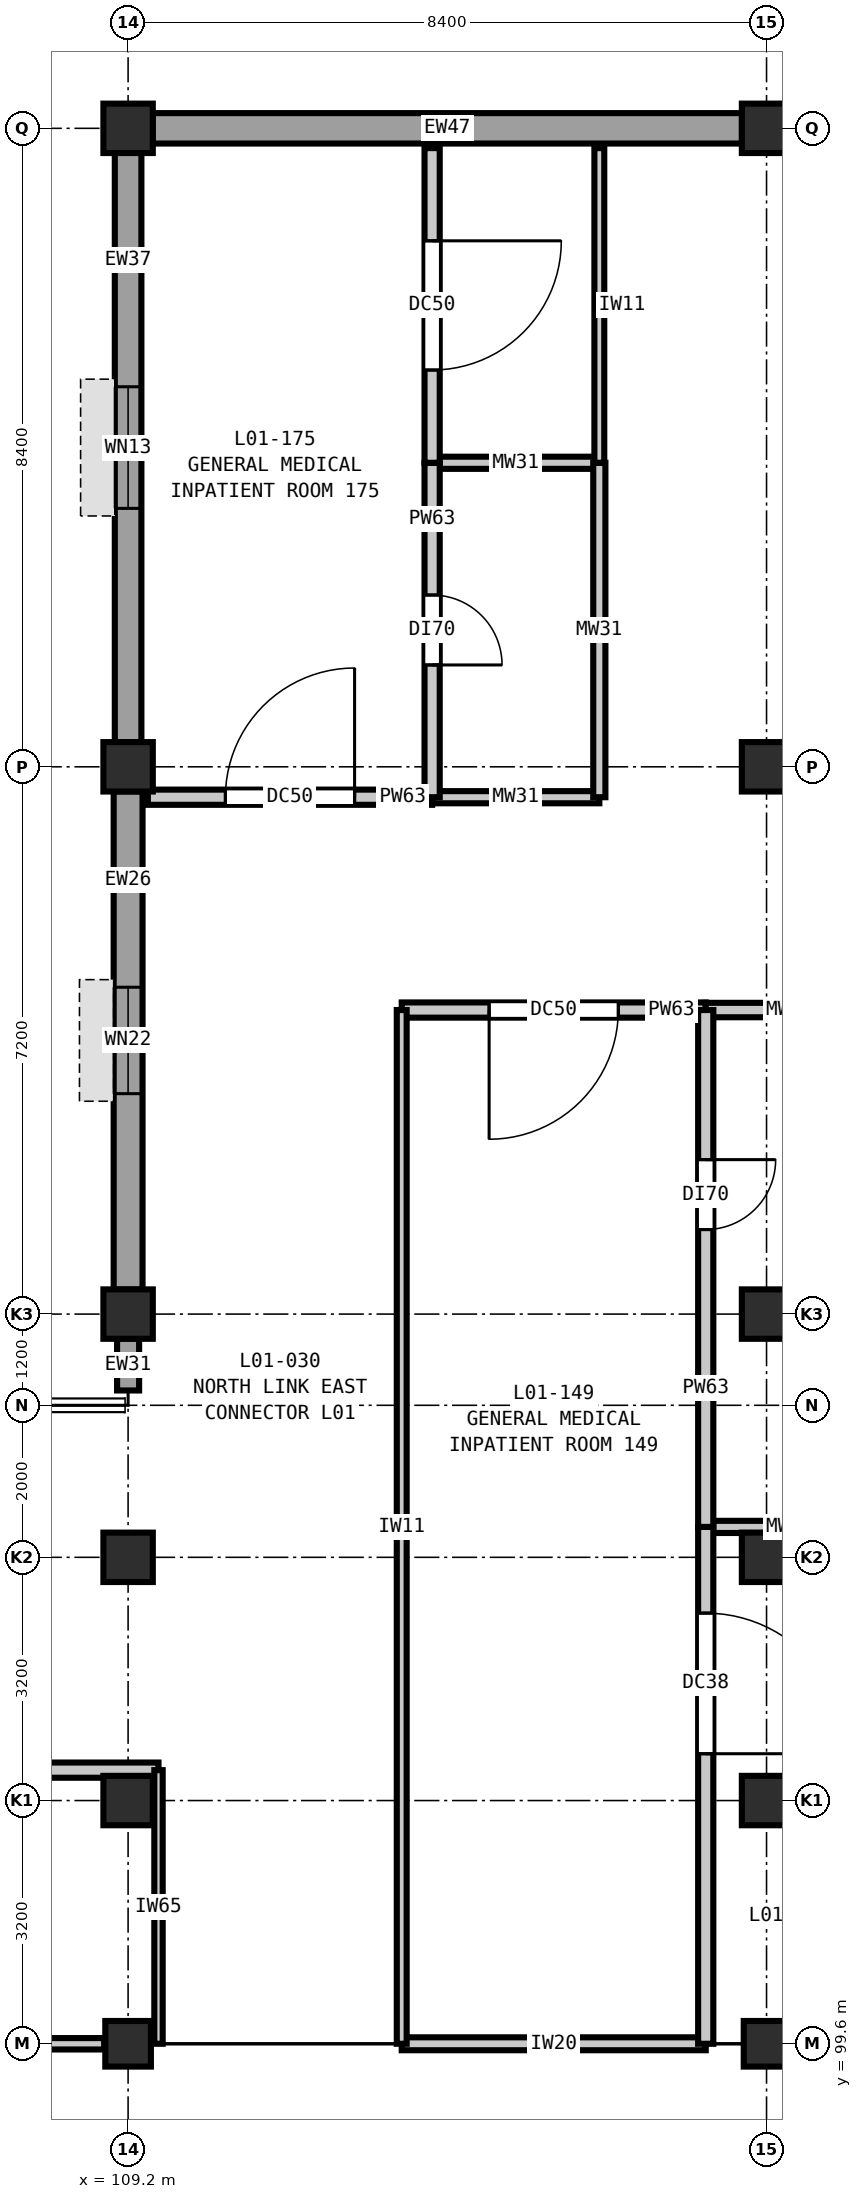
"""IFC4 building model, lengths in metres.
Left out: names, types, materials, properties, quantities, classifications, styles, units other than length and angle.
Written with IfcOpenShell. Run it as: python <this file> out.ifc"""

import sys

from ifc_helpers import new_model, si_unit, direction, frame, frame_2d, origin, origin_2d, place, context, subcontext, project, spatial, rectangle, extrude, element, fill, save


model = new_model("IFC4")
c1 = context("Model", 3, precision=1e-05, world=origin(), true_north=direction((0.0, 1.0)))
c2 = subcontext(c1, "Body", "Model", "MODEL_VIEW")
j1 = project(units=[si_unit("LENGTHUNIT", "METRE"), si_unit("PLANEANGLEUNIT", "RADIAN")], contexts=[c1])
p1 = place(None, origin())
s1 = spatial("IfcSite", under=j1, at=p1, CompositionType="ELEMENT")
p2 = place(p1, origin())
s2 = spatial("IfcBuilding", under=s1, at=p2, CompositionType="ELEMENT")
p3 = place(p2, frame((0.0, 0.0, 5.4)))
s3 = spatial("IfcBuildingStorey", under=s2, at=p3, CompositionType="ELEMENT", Elevation=5.4)
p4 = place(p3, frame((109.2, 99.6, 0.0), z_axis=(0.0, 0.0, 1.0), x_axis=(1.0, 0.0, 0.0)))
e1 = element("IfcColumn", 1, at=p4, inside=s3, PredefinedType="COLUMN", context=c2, shape_type="SweptSolid", body=[
    extrude(rectangle(XDim=0.6, YDim=0.6, at=origin_2d()), origin(), (0.0, 0.0, 1.0), 5.4),
])
for number, where, z_axis, x_axis in (
    (2, (109.2, 102.8, 0.0), (0.0, 0.0, 1.0), (1.0, 0.0, 0.0)),
    (3, (109.2, 106.0, 0.0), (0.0, 0.0, 1.0), (1.0, 0.0, 0.0)),
    (4, (109.2, 109.2, 0.0), (0.0, 0.0, 1.0), (1.0, 0.0, 0.0)),
    (5, (109.2, 116.4, 0.0), (0.0, 0.0, 1.0), (1.0, 0.0, 0.0)),
    (6, (109.2, 124.8, 0.0), (0.0, 0.0, 1.0), (1.0, 0.0, 0.0)),
):
    element("IfcColumn", number, at=place(p3, frame(where, z_axis=z_axis, x_axis=x_axis)), inside=s3, PredefinedType="COLUMN", context=c2, shape_type="SweptSolid", body=[
        extrude(rectangle(XDim=0.65, YDim=0.65, at=origin_2d()), origin(), (0.0, 0.0, 1.0), 5.4),
    ])
p5 = place(p3, frame((117.6, 99.6, 0.0), z_axis=(0.0, 0.0, 1.0), x_axis=(1.0, 0.0, 0.0)))
e7 = element("IfcColumn", 7, at=p5, inside=s3, PredefinedType="COLUMN", context=c2, shape_type="SweptSolid", body=[
    extrude(rectangle(XDim=0.6, YDim=0.6, at=origin_2d()), origin(), (0.0, 0.0, 1.0), 5.4),
])
for number, where, z_axis, x_axis in (
    (8, (117.6, 102.8, 0.0), (0.0, 0.0, 1.0), (1.0, 0.0, 0.0)),
    (9, (117.6, 106.0, 0.0), (0.0, 0.0, 1.0), (1.0, 0.0, 0.0)),
    (10, (117.6, 109.2, 0.0), (0.0, 0.0, 1.0), (1.0, 0.0, 0.0)),
    (11, (117.6, 116.4, 0.0), (0.0, 0.0, 1.0), (1.0, 0.0, 0.0)),
    (12, (117.6, 124.8, 0.0), (0.0, 0.0, 1.0), (1.0, 0.0, 0.0)),
):
    element("IfcColumn", number, at=place(p3, frame(where, z_axis=z_axis, x_axis=x_axis)), inside=s3, PredefinedType="COLUMN", context=c2, shape_type="SweptSolid", body=[
        extrude(rectangle(XDim=0.65, YDim=0.65, at=origin_2d()), origin(), (0.0, 0.0, 1.0), 5.4),
    ])
p6 = place(p3, frame((109.2, 108.195, 0.0), z_axis=(0.0, 0.0, 1.0), x_axis=(0.0, 1.0, 0.0)))
e13 = element("IfcWall", 13, at=p6, inside=s3, PredefinedType="SOLIDWALL", context=c2, shape_type="SweptSolid", body=[
    extrude(rectangle(XDim=0.682, YDim=0.29, at=frame_2d((0.341, 0.0))), origin(), (0.0, 0.0, 1.0), 4.68),
])
p7 = place(p3, frame((109.2, 109.523, 0.0), z_axis=(0.0, 0.0, 1.0), x_axis=(0.0, 1.0, 0.0)))
e14 = element("IfcWall", 14, at=p7, inside=s3, PredefinedType="SOLIDWALL", context=c2, shape_type="SweptSolid", body=[
    extrude(rectangle(XDim=6.554, YDim=0.38, at=frame_2d((3.277, 0.0))), origin(), (0.0, 0.0, 1.0), 4.68),
])
p8 = place(p7, frame((2.577, 0.0, 0.9)))
e15 = element("IfcOpeningElement", 15, at=p8, cuts=e14, PredefinedType="OPENING", context=c2, shape_type="SweptSolid", body=[
    extrude(rectangle(XDim=1.4, YDim=1.95, at=frame_2d((0.7, 0.975))), frame((0.0, 0.2, 0.0), z_axis=(0.0, -1.0, 0.0), x_axis=(1.0, 0.0, 0.0)), (0.0, 0.0, 1.0), 0.4),
])
p9 = place(p3, frame((109.2, 116.723, 0.0), z_axis=(0.0, 0.0, 1.0), x_axis=(0.0, 1.0, 0.0)))
e16 = element("IfcWall", 16, at=p9, inside=s3, PredefinedType="SOLIDWALL", context=c2, shape_type="SweptSolid", body=[
    extrude(rectangle(XDim=7.754, YDim=0.35, at=frame_2d((3.877, 0.0))), origin(), (0.0, 0.0, 1.0), 4.68),
])
p10 = place(p9, frame((3.077, 0.0, 0.9)))
e17 = element("IfcOpeningElement", 17, at=p10, cuts=e16, PredefinedType="OPENING", context=c2, shape_type="SweptSolid", body=[
    extrude(rectangle(XDim=1.6, YDim=1.95, at=frame_2d((0.8, 0.975))), frame((0.0, 0.185, 0.0), z_axis=(0.0, -1.0, 0.0), x_axis=(1.0, 0.0, 0.0)), (0.0, 0.0, 1.0), 0.37),
])
p11 = place(p3, frame((109.523, 124.8, 0.0), z_axis=(0.0, 0.0, 1.0), x_axis=(1.0, 0.0, 0.0)))
e18 = element("IfcWall", 18, at=p11, inside=s3, PredefinedType="SOLIDWALL", context=c2, shape_type="SweptSolid", body=[
    extrude(rectangle(XDim=7.754, YDim=0.4, at=frame_2d((3.877, 0.0))), origin(), (0.0, 0.0, 1.0), 4.68),
])
p12 = place(p3, frame((101.115, 99.6, 0.0), z_axis=(0.0, 0.0, 1.0), x_axis=(1.0, 0.0, 0.0)))
e19 = element("IfcWall", 19, at=p12, inside=s3, PredefinedType="PARTITIONING", context=c2, shape_type="SweptSolid", body=[
    extrude(rectangle(XDim=7.77, YDim=0.15, at=frame_2d((3.885, 0.0))), origin(), (0.0, 0.0, 1.0), 4.685),
])
p13 = place(p3, frame((112.8, 99.6, 0.0), z_axis=(0.0, 0.0, 1.0), x_axis=(1.0, 0.0, 0.0)))
e20 = element("IfcWall", 20, at=p13, inside=s3, PredefinedType="PARTITIONING", context=c2, shape_type="SweptSolid", body=[
    extrude(rectangle(XDim=4.0, YDim=0.17, at=frame_2d((2.0, 0.0))), origin(), (0.0, 0.0, 1.0), 4.685),
])
p14 = place(p3, frame((100.2, 103.2, 0.0), z_axis=(0.0, 0.0, 1.0), x_axis=(1.0, 0.0, 0.0)))
e21 = element("IfcWall", 21, at=p14, inside=s3, PredefinedType="PARTITIONING", context=c2, shape_type="SweptSolid", body=[
    extrude(rectangle(XDim=9.4, YDim=0.2, at=frame_2d((4.7, 0.0))), origin(), (0.0, 0.0, 1.0), 5.05),
])
p15 = place(p14, frame((3.975, 0.0, 0.0)))
e22 = element("IfcOpeningElement", 22, at=p15, cuts=e21, PredefinedType="OPENING", context=c2, shape_type="SweptSolid", body=[
    extrude(rectangle(XDim=1.45, YDim=2.25, at=frame_2d((0.725, 1.125))), frame((0.0, 0.11, 0.0), z_axis=(0.0, -1.0, 0.0), x_axis=(1.0, 0.0, 0.0)), (0.0, 0.0, 1.0), 0.22),
])
p16 = place(p3, frame((116.8, 106.4, 0.0), z_axis=(0.0, 0.0, 1.0), x_axis=(1.0, 0.0, 0.0)))
e23 = element("IfcWall", 23, at=p16, inside=s3, PredefinedType="PLUMBINGWALL", context=c2, shape_type="SweptSolid", body=[
    extrude(rectangle(XDim=2.2, YDim=0.16, at=frame_2d((1.1, 0.0))), origin(), (0.0, 0.0, 1.0), 5.05),
])
p17 = place(p3, frame((112.8, 113.2, 0.0), z_axis=(0.0, 0.0, 1.0), x_axis=(1.0, 0.0, 0.0)))
e24 = element("IfcWall", 24, at=p17, inside=s3, PredefinedType="PARTITIONING", context=c2, shape_type="SweptSolid", body=[
    extrude(rectangle(XDim=4.0, YDim=0.2, at=frame_2d((2.0, 0.0))), origin(), (0.0, 0.0, 1.0), 5.05),
])
p18 = place(p17, frame((1.15, 0.0, 0.0)))
e25 = element("IfcOpeningElement", 25, at=p18, cuts=e24, PredefinedType="OPENING", context=c2, shape_type="SweptSolid", body=[
    extrude(rectangle(XDim=1.7, YDim=2.3, at=frame_2d((0.85, 1.15))), frame((0.0, 0.11, 0.0), z_axis=(0.0, -1.0, 0.0), x_axis=(1.0, 0.0, 0.0)), (0.0, 0.0, 1.0), 0.22),
])
p19 = place(p3, frame((116.8, 113.2, 0.0), z_axis=(0.0, 0.0, 1.0), x_axis=(1.0, 0.0, 0.0)))
e26 = element("IfcWall", 26, at=p19, inside=s3, PredefinedType="PLUMBINGWALL", context=c2, shape_type="SweptSolid", body=[
    extrude(rectangle(XDim=2.2, YDim=0.19, at=frame_2d((1.1, 0.0))), origin(), (0.0, 0.0, 1.0), 5.05),
])
p20 = place(p3, frame((109.46, 116.0, 0.0), z_axis=(0.0, 0.0, 1.0), x_axis=(1.0, 0.0, 0.0)))
e27 = element("IfcWall", 27, at=p20, inside=s3, PredefinedType="PARTITIONING", context=c2, shape_type="SweptSolid", body=[
    extrude(rectangle(XDim=3.74, YDim=0.2, at=frame_2d((1.87, 0.0))), origin(), (0.0, 0.0, 1.0), 5.05),
])
p21 = place(p20, frame((1.02, 0.0, 0.0)))
e28 = element("IfcOpeningElement", 28, at=p21, cuts=e27, PredefinedType="OPENING", context=c2, shape_type="SweptSolid", body=[
    extrude(rectangle(XDim=1.7, YDim=2.3, at=frame_2d((0.85, 1.15))), frame((0.0, 0.11, 0.0), z_axis=(0.0, -1.0, 0.0), x_axis=(1.0, 0.0, 0.0)), (0.0, 0.0, 1.0), 0.22),
])
for number, where, z_axis, x_axis in (
    (29, (113.2, 116.0, 0.0), (0.0, 0.0, 1.0), (1.0, 0.0, 0.0)),
    (30, (113.2, 120.4, 0.0), (0.0, 0.0, 1.0), (1.0, 0.0, 0.0)),
):
    element("IfcWall", number, at=place(p3, frame(where, z_axis=z_axis, x_axis=x_axis)), inside=s3, PredefinedType="PLUMBINGWALL", context=c2, shape_type="SweptSolid", body=[
        extrude(rectangle(XDim=2.2, YDim=0.16, at=frame_2d((1.1, 0.0))), origin(), (0.0, 0.0, 1.0), 5.05),
    ])
p22 = place(p3, frame((109.6, 99.6, 0.0), z_axis=(0.0, 0.0, 1.0), x_axis=(0.0, 1.0, 0.0)))
e31 = element("IfcWall", 31, at=p22, inside=s3, PredefinedType="PARTITIONING", context=c2, shape_type="SweptSolid", body=[
    extrude(rectangle(XDim=3.6, YDim=0.11, at=frame_2d((1.8, 0.0))), origin(), (0.0, 0.0, 1.0), 5.05),
])
p23 = place(p3, frame((112.8, 99.6, 0.0), z_axis=(0.0, 0.0, 1.0), x_axis=(0.0, 1.0, 0.0)))
e32 = element("IfcWall", 32, at=p23, inside=s3, PredefinedType="PARTITIONING", context=c2, shape_type="SweptSolid", body=[
    extrude(rectangle(XDim=13.6, YDim=0.13, at=frame_2d((6.8, 0.0))), origin(), (0.0, 0.0, 1.0), 5.05),
])
p24 = place(p3, frame((113.2, 116.0, 0.0), z_axis=(0.0, 0.0, 1.0), x_axis=(0.0, 1.0, 0.0)))
e33 = element("IfcWall", 33, at=p24, inside=s3, PredefinedType="PARTITIONING", context=c2, shape_type="SweptSolid", body=[
    extrude(rectangle(XDim=4.4, YDim=0.2, at=frame_2d((2.2, 0.0))), origin(), (0.0, 0.0, 1.0), 5.05),
])
p25 = place(p24, frame((1.74, 0.0, 0.0)))
e34 = element("IfcOpeningElement", 34, at=p25, cuts=e33, PredefinedType="OPENING", context=c2, shape_type="SweptSolid", body=[
    extrude(rectangle(XDim=0.92, YDim=2.1, at=frame_2d((0.46, 1.05))), frame((0.0, 0.11, 0.0), z_axis=(0.0, -1.0, 0.0), x_axis=(1.0, 0.0, 0.0)), (0.0, 0.0, 1.0), 0.22),
])
p26 = place(p3, frame((113.2, 120.4, 0.0), z_axis=(0.0, 0.0, 1.0), x_axis=(0.0, 1.0, 0.0)))
e35 = element("IfcWall", 35, at=p26, inside=s3, PredefinedType="PARTITIONING", context=c2, shape_type="SweptSolid", body=[
    extrude(rectangle(XDim=4.14, YDim=0.2, at=frame_2d((2.07, 0.0))), origin(), (0.0, 0.0, 1.0), 5.05),
])
p27 = place(p26, frame((1.22, 0.0, 0.0)))
e36 = element("IfcOpeningElement", 36, at=p27, cuts=e35, PredefinedType="OPENING", context=c2, shape_type="SweptSolid", body=[
    extrude(rectangle(XDim=1.7, YDim=2.3, at=frame_2d((0.85, 1.15))), frame((0.0, 0.11, 0.0), z_axis=(0.0, -1.0, 0.0), x_axis=(1.0, 0.0, 0.0)), (0.0, 0.0, 1.0), 0.22),
])
p28 = place(p3, frame((115.4, 116.0, 0.0), z_axis=(0.0, 0.0, 1.0), x_axis=(0.0, 1.0, 0.0)))
e37 = element("IfcWall", 37, at=p28, inside=s3, PredefinedType="PLUMBINGWALL", context=c2, shape_type="SweptSolid", body=[
    extrude(rectangle(XDim=4.4, YDim=0.16, at=frame_2d((2.2, 0.0))), origin(), (0.0, 0.0, 1.0), 5.05),
])
p29 = place(p3, frame((115.4, 120.4, 0.0), z_axis=(0.0, 0.0, 1.0), x_axis=(0.0, 1.0, 0.0)))
e38 = element("IfcWall", 38, at=p29, inside=s3, PredefinedType="PARTITIONING", context=c2, shape_type="SweptSolid", body=[
    extrude(rectangle(XDim=4.14, YDim=0.13, at=frame_2d((2.07, 0.0))), origin(), (0.0, 0.0, 1.0), 5.05),
])
p30 = place(p3, frame((116.8, 99.6, 0.0), z_axis=(0.0, 0.0, 1.0), x_axis=(0.0, 1.0, 0.0)))
e39 = element("IfcWall", 39, at=p30, inside=s3, PredefinedType="PARTITIONING", context=c2, shape_type="SweptSolid", body=[
    extrude(rectangle(XDim=6.8, YDim=0.2, at=frame_2d((3.4, 0.0))), origin(), (0.0, 0.0, 1.0), 5.05),
])
p31 = place(p30, frame((3.816, 0.0, 0.0)))
e40 = element("IfcOpeningElement", 40, at=p31, cuts=e39, PredefinedType="OPENING", context=c2, shape_type="SweptSolid", body=[
    extrude(rectangle(XDim=1.85, YDim=2.3, at=frame_2d((0.925, 1.15))), frame((0.0, 0.11, 0.0), z_axis=(0.0, -1.0, 0.0), x_axis=(1.0, 0.0, 0.0)), (0.0, 0.0, 1.0), 0.22),
])
p32 = place(p3, frame((116.8, 106.4, 0.0), z_axis=(0.0, 0.0, 1.0), x_axis=(0.0, 1.0, 0.0)))
e41 = element("IfcWall", 41, at=p32, inside=s3, PredefinedType="PARTITIONING", context=c2, shape_type="SweptSolid", body=[
    extrude(rectangle(XDim=6.8, YDim=0.2, at=frame_2d((3.4, 0.0))), origin(), (0.0, 0.0, 1.0), 5.05),
])
p33 = place(p32, frame((3.912, 0.0, 0.0)))
e42 = element("IfcOpeningElement", 42, at=p33, cuts=e41, PredefinedType="OPENING", context=c2, shape_type="SweptSolid", body=[
    extrude(rectangle(XDim=0.92, YDim=2.1, at=frame_2d((0.46, 1.05))), frame((0.0, 0.11, 0.0), z_axis=(0.0, -1.0, 0.0), x_axis=(1.0, 0.0, 0.0)), (0.0, 0.0, 1.0), 0.22),
])
p34 = place(p8, origin())
e43 = element("IfcWindow", 43, at=p34, inside=s3, PartitioningType="SINGLE_PANEL", PredefinedType="WINDOW", context=c2, shape_type="SweptSolid", body=[
    extrude(rectangle(XDim=1.4, YDim=1.95, at=frame_2d((0.7, 0.975))), frame((0.0, 0.03, 0.0), z_axis=(0.0, -1.0, 0.0), x_axis=(1.0, 0.0, 0.0)), (0.0, 0.0, 1.0), 0.06),
])
fill(e15, e43)
p35 = place(p10, origin())
e44 = element("IfcWindow", 44, at=p35, inside=s3, PartitioningType="DOUBLE_PANEL_VERTICAL", PredefinedType="WINDOW", context=c2, shape_type="SweptSolid", body=[
    extrude(rectangle(XDim=1.6, YDim=1.95, at=frame_2d((0.8, 0.975))), frame((0.0, 0.03, 0.0), z_axis=(0.0, -1.0, 0.0), x_axis=(1.0, 0.0, 0.0)), (0.0, 0.0, 1.0), 0.06),
])
fill(e17, e44)
p36 = place(p18, frame((1.7, 0.0, 0.0), z_axis=(0.0, 0.0, 1.0), x_axis=(-1.0, 0.0, 0.0)))
e45 = element("IfcDoor", 45, at=p36, inside=s3, OperationType="SINGLE_SWING_RIGHT", PredefinedType="DOOR", context=c2, shape_type="SweptSolid", body=[
    extrude(rectangle(XDim=1.7, YDim=2.3, at=frame_2d((0.85, 1.15))), frame((0.0, 0.025, 0.0), z_axis=(0.0, -1.0, 0.0), x_axis=(1.0, 0.0, 0.0)), (0.0, 0.0, 1.0), 0.05),
])
fill(e25, e45)
p37 = place(p21, origin())
e46 = element("IfcDoor", 46, at=p37, inside=s3, OperationType="SINGLE_SWING_RIGHT", PredefinedType="DOOR", context=c2, shape_type="SweptSolid", body=[
    extrude(rectangle(XDim=1.7, YDim=2.3, at=frame_2d((0.85, 1.15))), frame((0.0, 0.025, 0.0), z_axis=(0.0, -1.0, 0.0), x_axis=(1.0, 0.0, 0.0)), (0.0, 0.0, 1.0), 0.05),
])
fill(e28, e46)
p38 = place(p25, frame((0.92, 0.0, 0.0), z_axis=(0.0, 0.0, 1.0), x_axis=(-1.0, 0.0, 0.0)))
e47 = element("IfcDoor", 47, at=p38, inside=s3, OperationType="SINGLE_SWING_RIGHT", PredefinedType="DOOR", context=c2, shape_type="SweptSolid", body=[
    extrude(rectangle(XDim=0.92, YDim=2.1, at=frame_2d((0.46, 1.05))), frame((0.0, 0.025, 0.0), z_axis=(0.0, -1.0, 0.0), x_axis=(1.0, 0.0, 0.0)), (0.0, 0.0, 1.0), 0.05),
])
fill(e34, e47)
p39 = place(p27, frame((1.7, 0.0, 0.0), z_axis=(0.0, 0.0, 1.0), x_axis=(-1.0, 0.0, 0.0)))
e48 = element("IfcDoor", 48, at=p39, inside=s3, OperationType="SINGLE_SWING_LEFT", PredefinedType="DOOR", context=c2, shape_type="SweptSolid", body=[
    extrude(rectangle(XDim=1.7, YDim=2.3, at=frame_2d((0.85, 1.15))), frame((0.0, 0.025, 0.0), z_axis=(0.0, -1.0, 0.0), x_axis=(1.0, 0.0, 0.0)), (0.0, 0.0, 1.0), 0.05),
])
fill(e36, e48)
p40 = place(p31, frame((1.85, 0.0, 0.0), z_axis=(0.0, 0.0, 1.0), x_axis=(-1.0, 0.0, 0.0)))
e49 = element("IfcDoor", 49, at=p40, inside=s3, OperationType="SINGLE_SWING_RIGHT", PredefinedType="DOOR", context=c2, shape_type="SweptSolid", body=[
    extrude(rectangle(XDim=1.85, YDim=2.3, at=frame_2d((0.925, 1.15))), frame((0.0, 0.025, 0.0), z_axis=(0.0, -1.0, 0.0), x_axis=(1.0, 0.0, 0.0)), (0.0, 0.0, 1.0), 0.05),
])
fill(e40, e49)
p41 = place(p33, frame((0.92, 0.0, 0.0), z_axis=(0.0, 0.0, 1.0), x_axis=(-1.0, 0.0, 0.0)))
e50 = element("IfcDoor", 50, at=p41, inside=s3, OperationType="SINGLE_SWING_LEFT", PredefinedType="DOOR", context=c2, shape_type="SweptSolid", body=[
    extrude(rectangle(XDim=0.92, YDim=2.1, at=frame_2d((0.46, 1.05))), frame((0.0, 0.025, 0.0), z_axis=(0.0, -1.0, 0.0), x_axis=(1.0, 0.0, 0.0)), (0.0, 0.0, 1.0), 0.05),
])
fill(e42, e50)
save(model, sys.argv[1])
